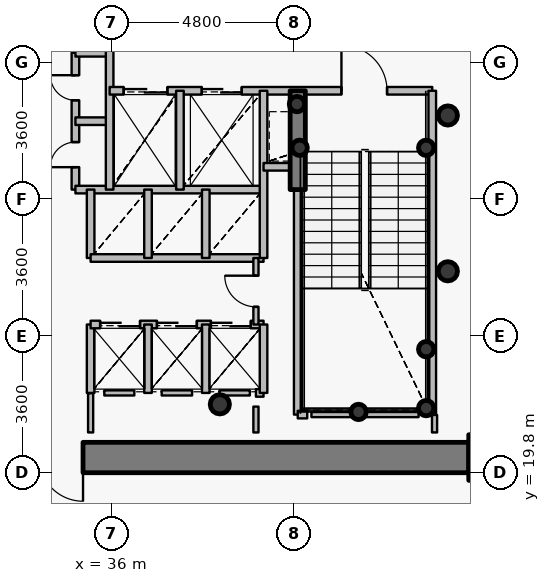
"""IFC4 building model, lengths in metres.
Left out: names, types, materials, properties, quantities, classifications, styles, units other than length and angle.
Written with IfcOpenShell. Run it as: python <this file> out.ifc"""

import sys

from ifc_helpers import new_model, si_unit, direction, frame, frame_2d, origin, origin_2d, place, context, subcontext, project, spatial, rectangle, hollow_circle, extrude, source, transform, mapped, element, fill, save


model = new_model("IFC4")
c1 = context("Model", 3, precision=1e-05, world=origin(), true_north=direction((0.0, 1.0)))
c2 = subcontext(c1, "Body", "Model", "MODEL_VIEW")
j1 = project(units=[si_unit("LENGTHUNIT", "METRE"), si_unit("PLANEANGLEUNIT", "RADIAN")], contexts=[c1])
p1 = place(None, origin())
s1 = spatial("IfcSite", under=j1, at=p1, CompositionType="ELEMENT")
p2 = place(p1, origin())
s2 = spatial("IfcBuilding", under=s1, at=p2, CompositionType="ELEMENT")
p3 = place(p2, frame((0.0, 0.0, 112.2)))
s3 = spatial("IfcBuildingStorey", under=s2, at=p3, CompositionType="ELEMENT", Elevation=112.2)
p4 = place(p3, frame((46.0, 20.2, 0.0), z_axis=(0.0, 0.0, 1.0), x_axis=(1.0, 0.0, 0.0)))
e1 = element("IfcColumn", 1, at=p4, inside=s3, PredefinedType="COLUMN", context=c2, shape_type="SweptSolid", body=[
    extrude(rectangle(XDim=1.2, YDim=1.2, at=origin_2d()), origin(), (0.0, 0.0, 1.0), 3.75),
])
p5 = place(p3, frame((38.85, 21.6, 0.0), z_axis=(0.0, 0.0, 1.0), x_axis=(1.0, 0.0, 0.0)))
e2 = element("IfcColumn", 2, at=p5, inside=s3, PredefinedType="COLUMN", context=c2, shape_type="SweptSolid", body=[
    extrude(hollow_circle(Radius=0.254, WallThickness=0.02, at=origin_2d()), origin(), (0.0, 0.0, 1.0), 3.75),
])
for number, where, z_axis, x_axis in (
    (3, (44.28, 21.5, 0.0), (0.0, 0.0, 1.0), (1.0, 0.0, 0.0)),
    (4, (44.28, 23.05, 0.0), (0.0, 0.0, 1.0), (1.0, 0.0, 0.0)),
    (5, (42.5, 21.4, 0.0), (0.0, 0.0, 1.0), (1.0, 0.0, 0.0)),
    (6, (40.95, 28.35, 0.0), (0.0, 0.0, 1.0), (1.0, 0.0, 0.0)),
    (7, (44.28, 28.35, 0.0), (0.0, 0.0, 1.0), (1.0, 0.0, 0.0)),
    (8, (40.88, 29.5, 0.0), (0.0, 0.0, 1.0), (1.0, 0.0, 0.0)),
):
    element("IfcColumn", number, at=place(p3, frame(where, z_axis=z_axis, x_axis=x_axis)), inside=s3, PredefinedType="COLUMN", context=c2, shape_type="SweptSolid", body=[
        extrude(hollow_circle(Radius=0.203, WallThickness=0.016, at=origin_2d()), origin(), (0.0, 0.0, 1.0), 3.75),
    ])
p6 = place(p3, frame((45.4, 20.2, 0.0), z_axis=(0.0, 0.0, 1.0), x_axis=(-1.0, 0.0, 0.0)))
e9 = element("IfcWall", 9, at=p6, inside=s3, PredefinedType="SHEAR", context=c2, shape_type="SweptSolid", body=[
    extrude(rectangle(XDim=18.8, YDim=0.8, at=frame_2d((9.4, 0.0))), origin(), (0.0, 0.0, 1.0), 2.95),
])
p7 = place(p6, frame((10.15, 0.0, 0.0)))
e10 = element("IfcOpeningElement", 10, at=p7, cuts=e9, PredefinedType="OPENING", context=c2, shape_type="SweptSolid", body=[
    extrude(rectangle(XDim=1.15, YDim=2.15, at=origin_2d()), frame((0.575, 0.41, 1.075), z_axis=(0.0, -1.0, 0.0), x_axis=(1.0, 0.0, 0.0)), (0.0, 0.0, 1.0), 0.82),
])
p8 = place(p3, frame((40.9, 27.25, 0.0), z_axis=(0.0, 0.0, 1.0), x_axis=(0.0, 1.0, 0.0)))
e11 = element("IfcWall", 11, at=p8, inside=s3, PredefinedType="SHEAR", context=c2, shape_type="SweptSolid", body=[
    extrude(rectangle(XDim=2.6, YDim=0.4, at=frame_2d((1.3, 0.0))), origin(), (0.0, 0.0, 1.0), 3.1),
])
for number, where, z_axis, x_axis in (
    (12, (44.85, 25.1, 0.0), (0.0, 0.0, 1.0), (1.0, 0.0, 0.0)),
    (13, (44.85, 29.2, 0.0), (0.0, 0.0, 1.0), (1.0, 0.0, 0.0)),
):
    element("IfcColumn", number, at=place(p3, frame(where, z_axis=z_axis, x_axis=x_axis)), inside=s3, PredefinedType="COLUMN", context=c2, shape_type="SweptSolid", body=[
        extrude(hollow_circle(Radius=0.254, WallThickness=0.02, at=origin_2d()), origin(), (0.0, 0.0, 1.0), 3.75),
    ])
p9 = place(p3, frame((35.05, 27.25, 0.0), z_axis=(0.0, 0.0, 1.0), x_axis=(0.0, 1.0, 0.0)))
e14 = element("IfcWall", 14, at=p9, inside=s3, PredefinedType="PARTITIONING", context=c2, shape_type="SweptSolid", body=[
    extrude(rectangle(XDim=3.6, YDim=0.2, at=frame_2d((1.8, 0.0))), origin(), (0.0, 0.0, 1.0), 3.5),
])
p10 = place(p9, frame((0.59, 0.0, 0.0)))
e15 = element("IfcOpeningElement", 15, at=p10, cuts=e14, PredefinedType="OPENING", context=c2, shape_type="SweptSolid", body=[
    extrude(rectangle(XDim=0.66, YDim=2.05, at=origin_2d()), frame((0.33, 0.11, 1.025), z_axis=(0.0, -1.0, 0.0), x_axis=(1.0, 0.0, 0.0)), (0.0, 0.0, 1.0), 0.22),
])
p11 = place(p9, frame((2.35, 0.0, 0.0)))
e16 = element("IfcOpeningElement", 16, at=p11, cuts=e14, PredefinedType="OPENING", context=c2, shape_type="SweptSolid", body=[
    extrude(rectangle(XDim=0.66, YDim=2.05, at=origin_2d()), frame((0.33, 0.11, 1.025), z_axis=(0.0, -1.0, 0.0), x_axis=(1.0, 0.0, 0.0)), (0.0, 0.0, 1.0), 0.22),
])
p12 = place(p3, frame((35.05, 27.25, 0.0), z_axis=(0.0, 0.0, 1.0), x_axis=(1.0, 0.0, 0.0)))
e17 = element("IfcWall", 17, at=p12, inside=s3, PredefinedType="PARTITIONING", context=c2, shape_type="SweptSolid", body=[
    extrude(rectangle(XDim=4.95, YDim=0.2, at=frame_2d((2.475, 0.0))), origin(), (0.0, 0.0, 1.0), 3.085),
])
for number, where, z_axis, x_axis in (
    (18, (35.05, 29.05, 0.0), (0.0, 0.0, 1.0), (1.0, 0.0, 0.0)),
    (19, (35.05, 30.85, 0.0), (0.0, 0.0, 1.0), (1.0, 0.0, 0.0)),
):
    element("IfcWall", number, at=place(p3, frame(where, z_axis=z_axis, x_axis=x_axis)), inside=s3, PredefinedType="PARTITIONING", context=c2, shape_type="SweptSolid", body=[
        extrude(rectangle(XDim=0.9, YDim=0.2, at=frame_2d((0.45, 0.0))), origin(), (0.0, 0.0, 1.0), 3.5),
    ])
p13 = place(p3, frame((35.45, 21.9, 0.0), z_axis=(0.0, 0.0, 1.0), x_axis=(0.0, 1.0, 0.0)))
e20 = element("IfcWall", 20, at=p13, inside=s3, PredefinedType="PARTITIONING", context=c2, shape_type="SweptSolid", body=[
    extrude(rectangle(XDim=1.8, YDim=0.2, at=frame_2d((0.9, 0.0))), origin(), (0.0, 0.0, 1.0), 3.5),
])
p14 = place(p3, frame((35.45, 23.7, 0.0), z_axis=(0.0, 0.0, 1.0), x_axis=(1.0, 0.0, 0.0)))
e21 = element("IfcWall", 21, at=p14, inside=s3, PredefinedType="PARTITIONING", context=c2, shape_type="SweptSolid", body=[
    extrude(rectangle(XDim=4.55, YDim=0.2, at=frame_2d((2.275, 0.0))), origin(), (0.0, 0.0, 1.0), 3.085),
])
p15 = place(p14, frame((0.25, 0.0, 0.0)))
e22 = element("IfcOpeningElement", 22, at=p15, cuts=e21, PredefinedType="OPENING", context=c2, shape_type="SweptSolid", body=[
    extrude(rectangle(XDim=1.05, YDim=2.15, at=origin_2d()), frame((0.525, 0.11, 1.075), z_axis=(0.0, -1.0, 0.0), x_axis=(1.0, 0.0, 0.0)), (0.0, 0.0, 1.0), 0.22),
])
p16 = place(p14, frame((1.745, 0.0, 0.0)))
e23 = element("IfcOpeningElement", 23, at=p16, cuts=e21, PredefinedType="OPENING", context=c2, shape_type="SweptSolid", body=[
    extrude(rectangle(XDim=1.05, YDim=2.15, at=origin_2d()), frame((0.525, 0.11, 1.075), z_axis=(0.0, -1.0, 0.0), x_axis=(1.0, 0.0, 0.0)), (0.0, 0.0, 1.0), 0.22),
])
p17 = place(p14, frame((3.165, 0.0, 0.0)))
e24 = element("IfcOpeningElement", 24, at=p17, cuts=e21, PredefinedType="OPENING", context=c2, shape_type="SweptSolid", body=[
    extrude(rectangle(XDim=1.05, YDim=2.15, at=origin_2d()), frame((0.525, 0.11, 1.075), z_axis=(0.0, -1.0, 0.0), x_axis=(1.0, 0.0, 0.0)), (0.0, 0.0, 1.0), 0.22),
])
p18 = place(p3, frame((35.45, 25.45, 0.0), z_axis=(0.0, 0.0, 1.0), x_axis=(0.0, 1.0, 0.0)))
e25 = element("IfcWall", 25, at=p18, inside=s3, PredefinedType="PARTITIONING", context=c2, shape_type="SweptSolid", body=[
    extrude(rectangle(XDim=1.8, YDim=0.2, at=frame_2d((0.9, 0.0))), origin(), (0.0, 0.0, 1.0), 3.5),
])
p19 = place(p3, frame((35.45, 25.45, 0.0), z_axis=(0.0, 0.0, 1.0), x_axis=(1.0, 0.0, 0.0)))
e26 = element("IfcWall", 26, at=p19, inside=s3, PredefinedType="PARTITIONING", context=c2, shape_type="SweptSolid", body=[
    extrude(rectangle(XDim=4.55, YDim=0.2, at=frame_2d((2.275, 0.0))), origin(), (0.0, 0.0, 1.0), 3.085),
])
p20 = place(p3, frame((35.95, 27.25, 0.0), z_axis=(0.0, 0.0, 1.0), x_axis=(0.0, 1.0, 0.0)))
e27 = element("IfcWall", 27, at=p20, inside=s3, PredefinedType="PARTITIONING", context=c2, shape_type="SweptSolid", body=[
    extrude(rectangle(XDim=3.8, YDim=0.2, at=frame_2d((1.9, 0.0))), origin(), (0.0, 0.0, 1.0), 3.5),
])
p21 = place(p3, frame((35.95, 29.85, 0.0), z_axis=(0.0, 0.0, 1.0), x_axis=(1.0, 0.0, 0.0)))
e28 = element("IfcWall", 28, at=p21, inside=s3, PredefinedType="PARTITIONING", context=c2, shape_type="SweptSolid", body=[
    extrude(rectangle(XDim=8.49, YDim=0.2, at=frame_2d((4.245, 0.0))), origin(), (0.0, 0.0, 1.0), 3.085),
])
p22 = place(p21, frame((6.1, 0.0, 0.0)))
e29 = element("IfcOpeningElement", 29, at=p22, cuts=e28, PredefinedType="OPENING", context=c2, shape_type="SweptSolid", body=[
    extrude(rectangle(XDim=1.2, YDim=2.15, at=origin_2d()), frame((0.6, 0.11, 1.075), z_axis=(0.0, -1.0, 0.0), x_axis=(1.0, 0.0, 0.0)), (0.0, 0.0, 1.0), 0.22),
])
p23 = place(p21, frame((0.37, 0.0, 0.0)))
e30 = element("IfcOpeningElement", 30, at=p23, cuts=e28, PredefinedType="OPENING", context=c2, shape_type="SweptSolid", body=[
    extrude(rectangle(XDim=1.15, YDim=2.15, at=origin_2d()), frame((0.575, 0.11, 1.075), z_axis=(0.0, -1.0, 0.0), x_axis=(1.0, 0.0, 0.0)), (0.0, 0.0, 1.0), 0.22),
])
p24 = place(p21, frame((2.425, 0.0, 0.0)))
e31 = element("IfcOpeningElement", 31, at=p24, cuts=e28, PredefinedType="OPENING", context=c2, shape_type="SweptSolid", body=[
    extrude(rectangle(XDim=1.05, YDim=2.15, at=origin_2d()), frame((0.525, 0.11, 1.075), z_axis=(0.0, -1.0, 0.0), x_axis=(1.0, 0.0, 0.0)), (0.0, 0.0, 1.0), 0.22),
])
for number, where, z_axis, x_axis in (
    (32, (36.96, 21.9, 0.0), (0.0, 0.0, 1.0), (0.0, 1.0, 0.0)),
    (33, (36.96, 25.45, 0.0), (0.0, 0.0, 1.0), (0.0, 1.0, 0.0)),
):
    element("IfcWall", number, at=place(p3, frame(where, z_axis=z_axis, x_axis=x_axis)), inside=s3, PredefinedType="PARTITIONING", context=c2, shape_type="SweptSolid", body=[
        extrude(rectangle(XDim=1.8, YDim=0.2, at=frame_2d((0.9, 0.0))), origin(), (0.0, 0.0, 1.0), 3.5),
    ])
p25 = place(p3, frame((37.8, 27.25, 0.0), z_axis=(0.0, 0.0, 1.0), x_axis=(0.0, 1.0, 0.0)))
e34 = element("IfcWall", 34, at=p25, inside=s3, PredefinedType="PARTITIONING", context=c2, shape_type="SweptSolid", body=[
    extrude(rectangle(XDim=2.6, YDim=0.2, at=frame_2d((1.3, 0.0))), origin(), (0.0, 0.0, 1.0), 3.5),
])
for number, where, z_axis, x_axis in (
    (35, (38.48, 21.9, 0.0), (0.0, 0.0, 1.0), (0.0, 1.0, 0.0)),
    (36, (38.48, 25.45, 0.0), (0.0, 0.0, 1.0), (0.0, 1.0, 0.0)),
):
    element("IfcWall", number, at=place(p3, frame(where, z_axis=z_axis, x_axis=x_axis)), inside=s3, PredefinedType="PARTITIONING", context=c2, shape_type="SweptSolid", body=[
        extrude(rectangle(XDim=1.8, YDim=0.2, at=frame_2d((0.9, 0.0))), origin(), (0.0, 0.0, 1.0), 3.5),
    ])
p26 = place(p3, frame((39.8, 21.9, 0.0), z_axis=(0.0, 0.0, 1.0), x_axis=(1.0, 0.0, 0.0)))
e37 = element("IfcWall", 37, at=p26, inside=s3, PredefinedType="PARTITIONING", context=c2, shape_type="SweptSolid", body=[
    extrude(rectangle(XDim=0.2, YDim=0.2, at=frame_2d((0.1, 0.0))), origin(), (0.0, 0.0, 1.0), 3.5),
])
p27 = place(p3, frame((39.8, 23.7, 0.0), z_axis=(0.0, 0.0, 1.0), x_axis=(0.0, 1.0, 0.0)))
e38 = element("IfcWall", 38, at=p27, inside=s3, PredefinedType="PARTITIONING", context=c2, shape_type="SweptSolid", body=[
    extrude(rectangle(XDim=1.75, YDim=0.135, at=frame_2d((0.875, 0.0))), origin(), (0.0, 0.0, 1.0), 3.5),
])
p28 = place(p27, frame((0.465, 0.0, 0.0)))
e39 = element("IfcOpeningElement", 39, at=p28, cuts=e38, PredefinedType="OPENING", context=c2, shape_type="SweptSolid", body=[
    extrude(rectangle(XDim=0.82, YDim=2.1, at=origin_2d()), frame((0.41, 0.078, 1.05), z_axis=(0.0, -1.0, 0.0), x_axis=(1.0, 0.0, 0.0)), (0.0, 0.0, 1.0), 0.155),
])
p29 = place(p3, frame((40.0, 21.9, 0.0), z_axis=(0.0, 0.0, 1.0), x_axis=(0.0, 1.0, 0.0)))
e40 = element("IfcWall", 40, at=p29, inside=s3, PredefinedType="PARTITIONING", context=c2, shape_type="SweptSolid", body=[
    extrude(rectangle(XDim=1.8, YDim=0.2, at=frame_2d((0.9, 0.0))), origin(), (0.0, 0.0, 1.0), 3.5),
])
p30 = place(p3, frame((40.0, 25.45, 0.0), z_axis=(0.0, 0.0, 1.0), x_axis=(0.0, 1.0, 0.0)))
e41 = element("IfcWall", 41, at=p30, inside=s3, PredefinedType="PARTITIONING", context=c2, shape_type="SweptSolid", body=[
    extrude(rectangle(XDim=4.4, YDim=0.2, at=frame_2d((2.2, 0.0))), origin(), (0.0, 0.0, 1.0), 3.5),
])
p31 = place(p3, frame((40.0, 27.85, 0.0), z_axis=(0.0, 0.0, 1.0), x_axis=(1.0, 0.0, 0.0)))
e42 = element("IfcWall", 42, at=p31, inside=s3, PredefinedType="PARTITIONING", context=c2, shape_type="SweptSolid", body=[
    extrude(rectangle(XDim=0.9, YDim=0.2, at=frame_2d((0.45, 0.0))), origin(), (0.0, 0.0, 1.0), 3.5),
])
p32 = place(p3, frame((40.9, 21.33, 0.0), z_axis=(0.0, 0.0, 1.0), x_axis=(0.0, 1.0, 0.0)))
e43 = element("IfcWall", 43, at=p32, inside=s3, PredefinedType="PARTITIONING", context=c2, shape_type="SweptSolid", body=[
    extrude(rectangle(XDim=5.91, YDim=0.2, at=frame_2d((2.955, 0.0))), origin(), (0.0, 0.0, 1.0), 3.035),
])
p33 = place(p3, frame((40.9, 21.33, 0.0), z_axis=(0.0, 0.0, 1.0), x_axis=(1.0, 0.0, 0.0)))
e44 = element("IfcWall", 44, at=p33, inside=s3, PredefinedType="PARTITIONING", context=c2, shape_type="SweptSolid", body=[
    extrude(rectangle(XDim=0.25, YDim=0.2, at=frame_2d((0.125, 0.0))), origin(), (0.0, 0.0, 1.0), 3.035),
])
p34 = place(p3, frame((44.44, 21.33, 0.0), z_axis=(0.0, 0.0, 1.0), x_axis=(0.0, 1.0, 0.0)))
e45 = element("IfcWall", 45, at=p34, inside=s3, PredefinedType="PARTITIONING", context=c2, shape_type="SweptSolid", body=[
    extrude(rectangle(XDim=8.52, YDim=0.2, at=frame_2d((4.26, 0.0))), origin(), (0.0, 0.0, 1.0), 3.5),
])
p35 = place(p3, frame((44.08, 21.33, 0.0), z_axis=(0.0, 0.0, 1.0), x_axis=(-1.0, 0.0, 0.0)))
e46 = element("IfcWall", 46, at=p35, inside=s3, PredefinedType="PARTITIONING", context=c2, shape_type="SweptSolid", body=[
    extrude(rectangle(XDim=2.82, YDim=0.135, at=frame_2d((1.41, 0.0))), origin(), (0.0, 0.0, 1.0), 3.035),
])
p36 = place(p3, frame((36.6, 21.9, 0.0), z_axis=(0.0, 0.0, 1.0), x_axis=(-1.0, 0.0, 0.0)))
e47 = element("IfcWall", 47, at=p36, inside=s3, PredefinedType="PARTITIONING", context=c2, shape_type="SweptSolid", body=[
    extrude(rectangle(XDim=0.79, YDim=0.135, at=frame_2d((0.395, 0.0))), origin(), (0.0, 0.0, 1.0), 3.5),
])
p37 = place(p3, frame((38.12, 21.9, 0.0), z_axis=(0.0, 0.0, 1.0), x_axis=(-1.0, 0.0, 0.0)))
e48 = element("IfcWall", 48, at=p37, inside=s3, PredefinedType="PARTITIONING", context=c2, shape_type="SweptSolid", body=[
    extrude(rectangle(XDim=0.8, YDim=0.135, at=frame_2d((0.4, 0.0))), origin(), (0.0, 0.0, 1.0), 3.5),
])
p38 = place(p3, frame((39.64, 21.9, 0.0), z_axis=(0.0, 0.0, 1.0), x_axis=(-1.0, 0.0, 0.0)))
e49 = element("IfcWall", 49, at=p38, inside=s3, PredefinedType="PARTITIONING", context=c2, shape_type="SweptSolid", body=[
    extrude(rectangle(XDim=0.8, YDim=0.135, at=frame_2d((0.4, 0.0))), origin(), (0.0, 0.0, 1.0), 3.085),
])
p39 = place(p3, frame((39.8, 20.86, 0.0), z_axis=(0.0, 0.0, 1.0), x_axis=(0.0, 1.0, 0.0)))
e50 = element("IfcWall", 50, at=p39, inside=s3, PredefinedType="PARTITIONING", context=c2, shape_type="SweptSolid", body=[
    extrude(rectangle(XDim=0.68, YDim=0.135, at=frame_2d((0.34, 0.0))), origin(), (0.0, 0.0, 1.0), 3.035),
])
p40 = place(p3, frame((44.5, 20.86, 0.0), z_axis=(0.0, 0.0, 1.0), x_axis=(0.0, 1.0, 0.0)))
e51 = element("IfcWall", 51, at=p40, inside=s3, PredefinedType="PARTITIONING", context=c2, shape_type="SweptSolid", body=[
    extrude(rectangle(XDim=0.46, YDim=0.135, at=frame_2d((0.23, 0.0))), origin(), (0.0, 0.0, 1.0), 3.5),
])
p41 = place(p3, frame((35.45, 21.89, 0.0), z_axis=(0.0, 0.0, 1.0), x_axis=(0.0, -1.0, 0.0)))
e52 = element("IfcWall", 52, at=p41, inside=s3, PredefinedType="PARTITIONING", context=c2, shape_type="SweptSolid", body=[
    extrude(rectangle(XDim=1.03, YDim=0.135, at=frame_2d((0.515, 0.0))), origin(), (0.0, 0.0, 1.0), 3.085),
])
p42 = place(p3, frame((45.41, 19.8, 0.0), z_axis=(0.0, 0.0, 1.0), x_axis=(1.0, 0.0, 0.0)))
e53 = element("IfcWall", 53, at=p42, inside=s3, PredefinedType="PARTITIONING", context=c2, shape_type="SweptSolid", body=[
    extrude(rectangle(XDim=0.99, YDim=0.135, at=frame_2d((0.495, 0.0))), origin(), (0.0, 0.0, 1.0), 2.935),
])
m1 = source(origin(), c2, "Body", "SweptSolid", [
    extrude(rectangle(XDim=1.15, YDim=2.15, at=origin_2d()), frame((0.575, 0.025, 1.075), z_axis=(0.0, -1.0, 0.0), x_axis=(1.0, 0.0, 0.0)), (0.0, 0.0, 1.0), 0.05),
])
p43 = place(p7, origin())
e54 = element("IfcDoor", 54, at=p43, inside=s3, OperationType="SINGLE_SWING_LEFT", PredefinedType="DOOR", context=c2, shape_type="MappedRepresentation", body=[
    mapped(m1, transform((0.0, 0.0, 0.0), x_axis=(1.0, 0.0, 0.0), y_axis=(0.0, 1.0, 0.0), z_axis=(0.0, 0.0, 1.0), scale=1.0)),
])
fill(e10, e54)
m2 = source(origin(), c2, "Body", "SweptSolid", [
    extrude(rectangle(XDim=1.2, YDim=2.15, at=origin_2d()), frame((0.6, 0.025, 1.075), z_axis=(0.0, -1.0, 0.0), x_axis=(1.0, 0.0, 0.0)), (0.0, 0.0, 1.0), 0.05),
])
p44 = place(p22, origin())
e55 = element("IfcDoor", 55, at=p44, inside=s3, OperationType="SINGLE_SWING_LEFT", PredefinedType="DOOR", context=c2, shape_type="MappedRepresentation", body=[
    mapped(m2, transform((0.0, 0.0, 0.0), x_axis=(1.0, 0.0, 0.0), y_axis=(0.0, 1.0, 0.0), z_axis=(0.0, 0.0, 1.0), scale=1.0)),
])
fill(e29, e55)
m3 = source(origin(), c2, "Body", "SweptSolid", [
    extrude(rectangle(XDim=1.15, YDim=2.15, at=origin_2d()), frame((0.575, 0.025, 1.075), z_axis=(0.0, -1.0, 0.0), x_axis=(1.0, 0.0, 0.0)), (0.0, 0.0, 1.0), 0.05),
])
p45 = place(p23, origin())
e56 = element("IfcDoor", 56, at=p45, inside=s3, OperationType="DOUBLE_DOOR_SLIDING", PredefinedType="USERDEFINED", context=c2, shape_type="MappedRepresentation", body=[
    mapped(m3, transform((0.0, 0.0, 0.0), x_axis=(1.0, 0.0, 0.0), y_axis=(0.0, 1.0, 0.0), z_axis=(0.0, 0.0, 1.0), scale=1.0)),
])
fill(e30, e56)
m4 = source(origin(), c2, "Body", "SweptSolid", [
    extrude(rectangle(XDim=1.05, YDim=2.15, at=origin_2d()), frame((0.525, 0.025, 1.075), z_axis=(0.0, -1.0, 0.0), x_axis=(1.0, 0.0, 0.0)), (0.0, 0.0, 1.0), 0.05),
])
p46 = place(p24, origin())
e57 = element("IfcDoor", 57, at=p46, inside=s3, OperationType="DOUBLE_DOOR_SLIDING", PredefinedType="USERDEFINED", context=c2, shape_type="MappedRepresentation", body=[
    mapped(m4, transform((0.0, 0.0, 0.0), x_axis=(1.0, 0.0, 0.0), y_axis=(0.0, 1.0, 0.0), z_axis=(0.0, 0.0, 1.0), scale=1.0)),
])
fill(e31, e57)
p47 = place(p15, origin())
e58 = element("IfcDoor", 58, at=p47, inside=s3, OperationType="DOUBLE_DOOR_SLIDING", PredefinedType="USERDEFINED", context=c2, shape_type="MappedRepresentation", body=[
    mapped(m4, transform((0.0, 0.0, 0.0), x_axis=(1.0, 0.0, 0.0), y_axis=(0.0, 1.0, 0.0), z_axis=(0.0, 0.0, 1.0), scale=1.0)),
])
fill(e22, e58)
p48 = place(p16, origin())
e59 = element("IfcDoor", 59, at=p48, inside=s3, OperationType="DOUBLE_DOOR_SLIDING", PredefinedType="USERDEFINED", context=c2, shape_type="MappedRepresentation", body=[
    mapped(m4, transform((0.0, 0.0, 0.0), x_axis=(1.0, 0.0, 0.0), y_axis=(0.0, 1.0, 0.0), z_axis=(0.0, 0.0, 1.0), scale=1.0)),
])
fill(e23, e59)
p49 = place(p17, origin())
e60 = element("IfcDoor", 60, at=p49, inside=s3, OperationType="DOUBLE_DOOR_SLIDING", PredefinedType="USERDEFINED", context=c2, shape_type="MappedRepresentation", body=[
    mapped(m4, transform((0.0, 0.0, 0.0), x_axis=(1.0, 0.0, 0.0), y_axis=(0.0, 1.0, 0.0), z_axis=(0.0, 0.0, 1.0), scale=1.0)),
])
fill(e24, e60)
m5 = source(origin(), c2, "Body", "SweptSolid", [
    extrude(rectangle(XDim=0.66, YDim=2.05, at=origin_2d()), frame((0.33, 0.025, 1.025), z_axis=(0.0, -1.0, 0.0), x_axis=(1.0, 0.0, 0.0)), (0.0, 0.0, 1.0), 0.05),
])
p50 = place(p10, origin())
e61 = element("IfcDoor", 61, at=p50, inside=s3, OperationType="SINGLE_SWING_LEFT", PredefinedType="USERDEFINED", context=c2, shape_type="MappedRepresentation", body=[
    mapped(m5, transform((0.0, 0.0, 0.0), x_axis=(1.0, 0.0, 0.0), y_axis=(0.0, 1.0, 0.0), z_axis=(0.0, 0.0, 1.0), scale=1.0)),
])
fill(e15, e61)
p51 = place(p11, origin())
e62 = element("IfcDoor", 62, at=p51, inside=s3, OperationType="SINGLE_SWING_RIGHT", PredefinedType="USERDEFINED", context=c2, shape_type="MappedRepresentation", body=[
    mapped(m5, transform((0.0, 0.0, 0.0), x_axis=(1.0, 0.0, 0.0), y_axis=(0.0, 1.0, 0.0), z_axis=(0.0, 0.0, 1.0), scale=1.0)),
])
fill(e16, e62)
m6 = source(origin(), c2, "Body", "SweptSolid", [
    extrude(rectangle(XDim=0.82, YDim=2.1, at=origin_2d()), frame((0.41, 0.025, 1.05), z_axis=(0.0, -1.0, 0.0), x_axis=(1.0, 0.0, 0.0)), (0.0, 0.0, 1.0), 0.05),
])
p52 = place(p28, origin())
e63 = element("IfcDoor", 63, at=p52, inside=s3, OperationType="SINGLE_SWING_RIGHT", PredefinedType="DOOR", context=c2, shape_type="MappedRepresentation", body=[
    mapped(m6, transform((0.0, 0.0, 0.0), x_axis=(1.0, 0.0, 0.0), y_axis=(0.0, 1.0, 0.0), z_axis=(0.0, 0.0, 1.0), scale=1.0)),
])
fill(e39, e63)
save(model, sys.argv[1])
